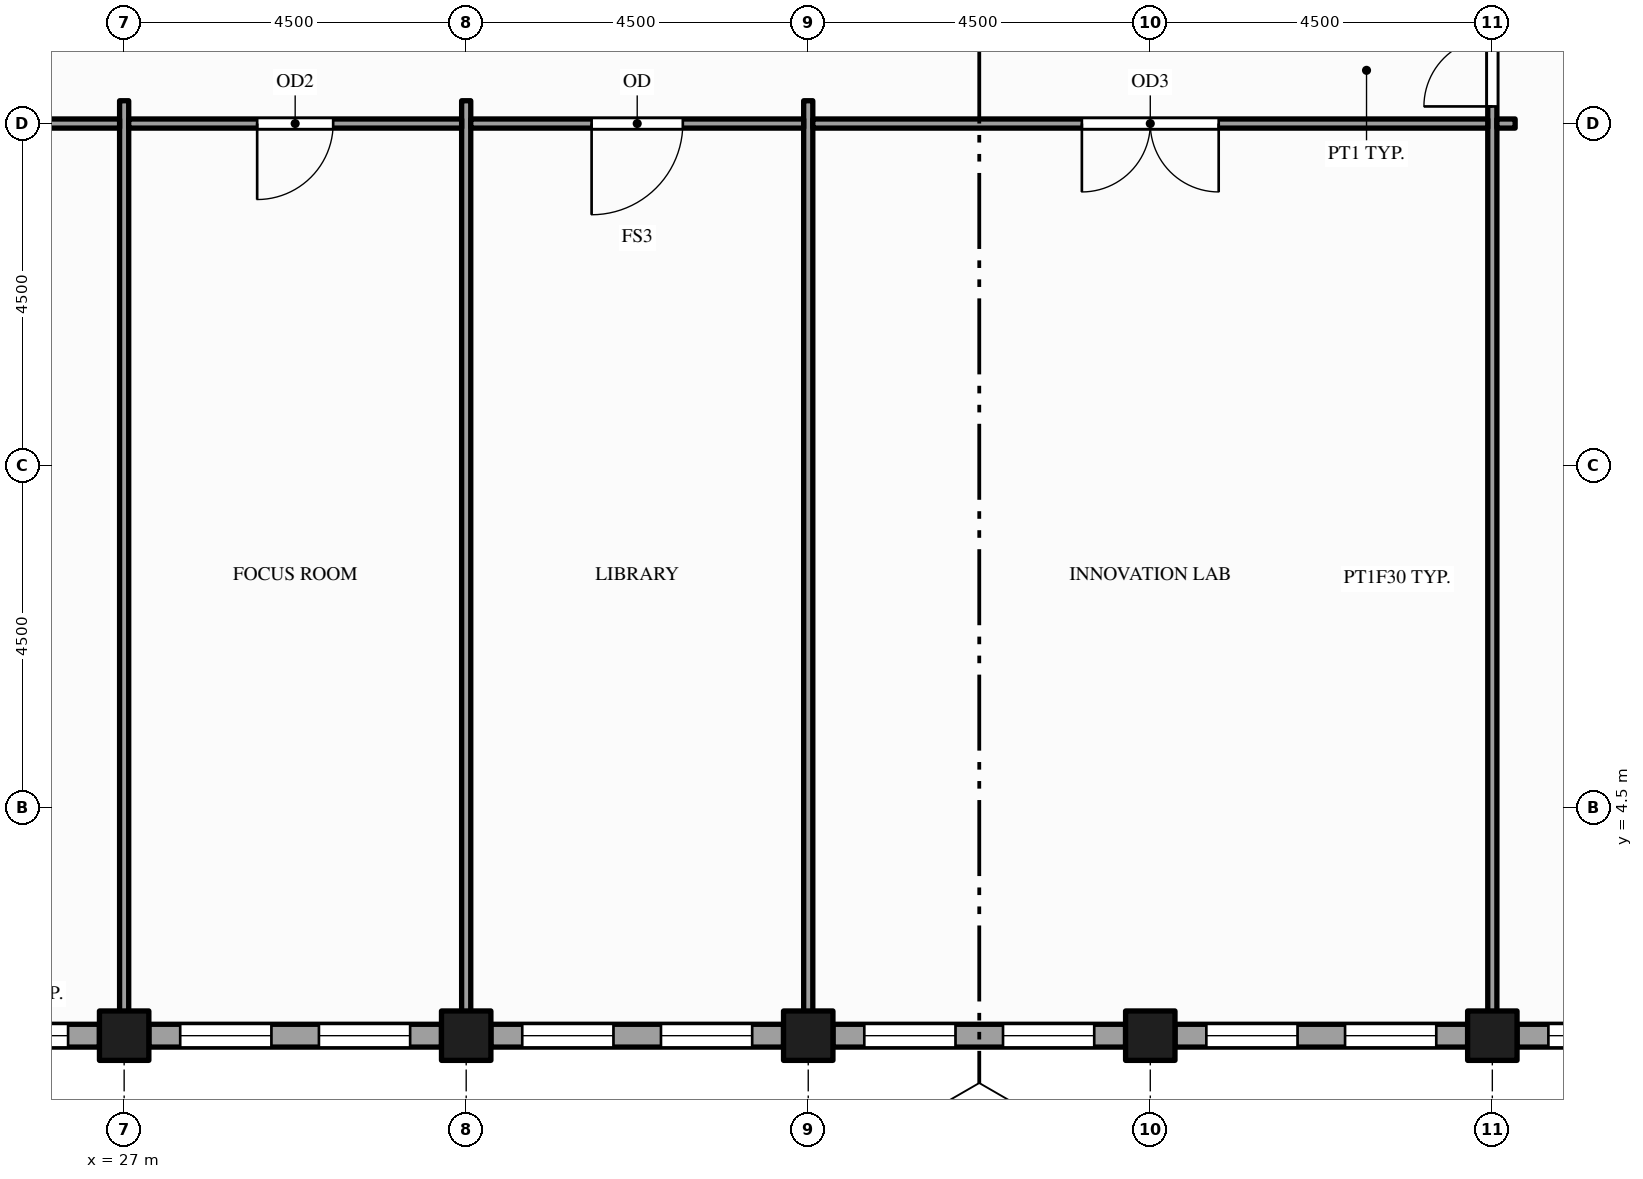
"""IFC4 building model, lengths in metres.
Left out: names, types, materials, properties, quantities, classifications, styles, units other than length and angle.
Written with IfcOpenShell. Run it as: python <this file> out.ifc"""

import sys

from ifc_helpers import new_model, si_unit, direction, frame, frame_2d, origin, origin_2d, place, context, subcontext, project, spatial, rectangle, hollow_rectangle, extrude, element, fill, save


model = new_model("IFC4")
c1 = context("Model", 3, precision=1e-05, world=origin(), true_north=direction((0.0, 1.0)))
c2 = subcontext(c1, "Body", "Model", "MODEL_VIEW")
j1 = project(units=[si_unit("LENGTHUNIT", "METRE"), si_unit("PLANEANGLEUNIT", "RADIAN")], contexts=[c1])
p1 = place(None, origin())
s1 = spatial("IfcSite", under=j1, at=p1, CompositionType="ELEMENT")
p2 = place(p1, origin())
s2 = spatial("IfcBuilding", under=s1, at=p2, CompositionType="ELEMENT")
p3 = place(p2, frame((0.0, 0.0, 285.0)))
s3 = spatial("IfcBuildingStorey", under=s2, at=p3, CompositionType="ELEMENT", Elevation=285.0)
for number, where, z_axis, x_axis in (
    (1, (27.0, 1.5, -0.15), (0.0, 0.0, 1.0), (1.0, 0.0, 0.0)),
    (2, (31.5, 1.5, -0.15), (0.0, 0.0, 1.0), (1.0, 0.0, 0.0)),
    (3, (36.0, 1.5, -0.15), (0.0, 0.0, 1.0), (1.0, 0.0, 0.0)),
    (4, (40.5, 1.5, -0.15), (0.0, 0.0, 1.0), (1.0, 0.0, 0.0)),
    (5, (45.0, 1.5, -0.15), (0.0, 0.0, 1.0), (1.0, 0.0, 0.0)),
):
    element("IfcColumn", number, at=place(p3, frame(where, z_axis=z_axis, x_axis=x_axis)), inside=s3, PredefinedType="COLUMN", context=c2, shape_type="SweptSolid", body=[
        extrude(hollow_rectangle(XDim=0.65, YDim=0.65, WallThickness=0.032, at=origin_2d()), origin(), (0.0, 0.0, 1.0), 4.0),
    ])
p4 = place(p3, frame((22.825, 1.5, 0.0), z_axis=(0.0, 0.0, 1.0), x_axis=(1.0, 0.0, 0.0)))
e6 = element("IfcWall", 6, at=p4, inside=s3, PredefinedType="STANDARD", context=c2, shape_type="SweptSolid", body=[
    extrude(rectangle(XDim=3.85, YDim=0.3, at=frame_2d((1.925, 0.0))), origin(), (0.0, 0.0, 1.0), 2.87),
])
p5 = place(p4, frame((0.413, 0.0, 0.9)))
e7 = element("IfcOpeningElement", 7, at=p5, cuts=e6, PredefinedType="OPENING", context=c2, shape_type="SweptSolid", body=[
    extrude(rectangle(XDim=1.2, YDim=1.75, at=frame_2d((0.6, 0.875))), frame((0.0, 0.16, 0.0), z_axis=(0.0, -1.0, 0.0), x_axis=(1.0, 0.0, 0.0)), (0.0, 0.0, 1.0), 0.32),
])
p6 = place(p4, frame((2.238, 0.0, 0.9)))
e8 = element("IfcOpeningElement", 8, at=p6, cuts=e6, PredefinedType="OPENING", context=c2, shape_type="SweptSolid", body=[
    extrude(rectangle(XDim=1.2, YDim=1.75, at=frame_2d((0.6, 0.875))), frame((0.0, 0.16, 0.0), z_axis=(0.0, -1.0, 0.0), x_axis=(1.0, 0.0, 0.0)), (0.0, 0.0, 1.0), 0.32),
])
p7 = place(p3, frame((27.325, 1.5, 0.0), z_axis=(0.0, 0.0, 1.0), x_axis=(1.0, 0.0, 0.0)))
e9 = element("IfcWall", 9, at=p7, inside=s3, PredefinedType="STANDARD", context=c2, shape_type="SweptSolid", body=[
    extrude(rectangle(XDim=3.85, YDim=0.3, at=frame_2d((1.925, 0.0))), origin(), (0.0, 0.0, 1.0), 2.87),
])
p8 = place(p7, frame((0.413, 0.0, 0.9)))
e10 = element("IfcOpeningElement", 10, at=p8, cuts=e9, PredefinedType="OPENING", context=c2, shape_type="SweptSolid", body=[
    extrude(rectangle(XDim=1.2, YDim=1.75, at=frame_2d((0.6, 0.875))), frame((0.0, 0.16, 0.0), z_axis=(0.0, -1.0, 0.0), x_axis=(1.0, 0.0, 0.0)), (0.0, 0.0, 1.0), 0.32),
])
p9 = place(p7, frame((2.238, 0.0, 0.9)))
e11 = element("IfcOpeningElement", 11, at=p9, cuts=e9, PredefinedType="OPENING", context=c2, shape_type="SweptSolid", body=[
    extrude(rectangle(XDim=1.2, YDim=1.75, at=frame_2d((0.6, 0.875))), frame((0.0, 0.16, 0.0), z_axis=(0.0, -1.0, 0.0), x_axis=(1.0, 0.0, 0.0)), (0.0, 0.0, 1.0), 0.32),
])
p10 = place(p3, frame((31.825, 1.5, 0.0), z_axis=(0.0, 0.0, 1.0), x_axis=(1.0, 0.0, 0.0)))
e12 = element("IfcWall", 12, at=p10, inside=s3, PredefinedType="STANDARD", context=c2, shape_type="SweptSolid", body=[
    extrude(rectangle(XDim=3.85, YDim=0.3, at=frame_2d((1.925, 0.0))), origin(), (0.0, 0.0, 1.0), 2.87),
])
p11 = place(p10, frame((0.413, 0.0, 0.9)))
e13 = element("IfcOpeningElement", 13, at=p11, cuts=e12, PredefinedType="OPENING", context=c2, shape_type="SweptSolid", body=[
    extrude(rectangle(XDim=1.2, YDim=1.75, at=frame_2d((0.6, 0.875))), frame((0.0, 0.16, 0.0), z_axis=(0.0, -1.0, 0.0), x_axis=(1.0, 0.0, 0.0)), (0.0, 0.0, 1.0), 0.32),
])
p12 = place(p10, frame((2.238, 0.0, 0.9)))
e14 = element("IfcOpeningElement", 14, at=p12, cuts=e12, PredefinedType="OPENING", context=c2, shape_type="SweptSolid", body=[
    extrude(rectangle(XDim=1.2, YDim=1.75, at=frame_2d((0.6, 0.875))), frame((0.0, 0.16, 0.0), z_axis=(0.0, -1.0, 0.0), x_axis=(1.0, 0.0, 0.0)), (0.0, 0.0, 1.0), 0.32),
])
p13 = place(p3, frame((36.325, 1.5, 0.0), z_axis=(0.0, 0.0, 1.0), x_axis=(1.0, 0.0, 0.0)))
e15 = element("IfcWall", 15, at=p13, inside=s3, PredefinedType="STANDARD", context=c2, shape_type="SweptSolid", body=[
    extrude(rectangle(XDim=3.85, YDim=0.3, at=frame_2d((1.925, 0.0))), origin(), (0.0, 0.0, 1.0), 2.87),
])
p14 = place(p13, frame((0.413, 0.0, 0.9)))
e16 = element("IfcOpeningElement", 16, at=p14, cuts=e15, PredefinedType="OPENING", context=c2, shape_type="SweptSolid", body=[
    extrude(rectangle(XDim=1.2, YDim=1.75, at=frame_2d((0.6, 0.875))), frame((0.0, 0.16, 0.0), z_axis=(0.0, -1.0, 0.0), x_axis=(1.0, 0.0, 0.0)), (0.0, 0.0, 1.0), 0.32),
])
p15 = place(p13, frame((2.238, 0.0, 0.9)))
e17 = element("IfcOpeningElement", 17, at=p15, cuts=e15, PredefinedType="OPENING", context=c2, shape_type="SweptSolid", body=[
    extrude(rectangle(XDim=1.2, YDim=1.75, at=frame_2d((0.6, 0.875))), frame((0.0, 0.16, 0.0), z_axis=(0.0, -1.0, 0.0), x_axis=(1.0, 0.0, 0.0)), (0.0, 0.0, 1.0), 0.32),
])
p16 = place(p3, frame((40.825, 1.5, 0.0), z_axis=(0.0, 0.0, 1.0), x_axis=(1.0, 0.0, 0.0)))
e18 = element("IfcWall", 18, at=p16, inside=s3, PredefinedType="STANDARD", context=c2, shape_type="SweptSolid", body=[
    extrude(rectangle(XDim=3.85, YDim=0.3, at=frame_2d((1.925, 0.0))), origin(), (0.0, 0.0, 1.0), 2.87),
])
p17 = place(p16, frame((0.413, 0.0, 0.9)))
e19 = element("IfcOpeningElement", 19, at=p17, cuts=e18, PredefinedType="OPENING", context=c2, shape_type="SweptSolid", body=[
    extrude(rectangle(XDim=1.2, YDim=1.75, at=frame_2d((0.6, 0.875))), frame((0.0, 0.16, 0.0), z_axis=(0.0, -1.0, 0.0), x_axis=(1.0, 0.0, 0.0)), (0.0, 0.0, 1.0), 0.32),
])
p18 = place(p16, frame((2.238, 0.0, 0.9)))
e20 = element("IfcOpeningElement", 20, at=p18, cuts=e18, PredefinedType="OPENING", context=c2, shape_type="SweptSolid", body=[
    extrude(rectangle(XDim=1.2, YDim=1.75, at=frame_2d((0.6, 0.875))), frame((0.0, 0.16, 0.0), z_axis=(0.0, -1.0, 0.0), x_axis=(1.0, 0.0, 0.0)), (0.0, 0.0, 1.0), 0.32),
])
p19 = place(p3, frame((45.325, 1.5, 0.0), z_axis=(0.0, 0.0, 1.0), x_axis=(1.0, 0.0, 0.0)))
e21 = element("IfcWall", 21, at=p19, inside=s3, PredefinedType="STANDARD", context=c2, shape_type="SweptSolid", body=[
    extrude(rectangle(XDim=3.85, YDim=0.3, at=frame_2d((1.925, 0.0))), origin(), (0.0, 0.0, 1.0), 2.87),
])
p20 = place(p19, frame((0.413, 0.0, 0.9)))
e22 = element("IfcOpeningElement", 22, at=p20, cuts=e21, PredefinedType="OPENING", context=c2, shape_type="SweptSolid", body=[
    extrude(rectangle(XDim=1.2, YDim=1.75, at=frame_2d((0.6, 0.875))), frame((0.0, 0.16, 0.0), z_axis=(0.0, -1.0, 0.0), x_axis=(1.0, 0.0, 0.0)), (0.0, 0.0, 1.0), 0.32),
])
p21 = place(p19, frame((2.238, 0.0, 0.9)))
e23 = element("IfcOpeningElement", 23, at=p21, cuts=e21, PredefinedType="OPENING", context=c2, shape_type="SweptSolid", body=[
    extrude(rectangle(XDim=1.2, YDim=1.75, at=frame_2d((0.6, 0.875))), frame((0.0, 0.16, 0.0), z_axis=(0.0, -1.0, 0.0), x_axis=(1.0, 0.0, 0.0)), (0.0, 0.0, 1.0), 0.32),
])
for number, where, z_axis, x_axis in (
    (24, (27.0, 1.65, 0.0), (0.0, 0.0, 1.0), (0.0, 1.0, 0.0)),
    (25, (31.5, 1.65, 0.0), (0.0, 0.0, 1.0), (0.0, 1.0, 0.0)),
    (26, (36.0, 1.65, 0.0), (0.0, 0.0, 1.0), (0.0, 1.0, 0.0)),
):
    element("IfcWall", number, at=place(p3, frame(where, z_axis=z_axis, x_axis=x_axis)), inside=s3, PredefinedType="PARTITIONING", context=c2, shape_type="SweptSolid", body=[
        extrude(rectangle(XDim=12.15, YDim=0.12, at=frame_2d((6.075, 0.0))), origin(), (0.0, 0.0, 1.0), 2.87),
    ])
p22 = place(p3, frame((45.0, 1.65, 0.0), z_axis=(0.0, 0.0, 1.0), x_axis=(0.0, 1.0, 0.0)))
e27 = element("IfcWall", 27, at=p22, inside=s3, PredefinedType="PARTITIONING", context=c2, shape_type="SweptSolid", body=[
    extrude(rectangle(XDim=22.2, YDim=0.12, at=frame_2d((11.1, 0.0))), origin(), (0.0, 0.0, 1.0), 2.87),
])
p23 = place(p22, frame((12.075, 0.0, 0.0)))
e28 = element("IfcOpeningElement", 28, at=p23, cuts=e27, PredefinedType="OPENING", context=c2, shape_type="SweptSolid", body=[
    extrude(rectangle(XDim=1.8, YDim=2.1, at=frame_2d((0.9, 1.05))), frame((0.0, 0.07, 0.0), z_axis=(0.0, -1.0, 0.0), x_axis=(1.0, 0.0, 0.0)), (0.0, 0.0, 1.0), 0.14),
])
p24 = place(p22, frame((15.1, 0.0, 0.0)))
e29 = element("IfcOpeningElement", 29, at=p24, cuts=e27, PredefinedType="OPENING", context=c2, shape_type="SweptSolid", body=[
    extrude(rectangle(XDim=0.9, YDim=2.1, at=frame_2d((0.45, 1.05))), frame((0.0, 0.07, 0.0), z_axis=(0.0, -1.0, 0.0), x_axis=(1.0, 0.0, 0.0)), (0.0, 0.0, 1.0), 0.14),
])
p25 = place(p22, frame((17.775, 0.0, 0.0)))
e30 = element("IfcOpeningElement", 30, at=p25, cuts=e27, PredefinedType="OPENING", context=c2, shape_type="SweptSolid", body=[
    extrude(rectangle(XDim=0.9, YDim=2.1, at=frame_2d((0.45, 1.05))), frame((0.0, 0.07, 0.0), z_axis=(0.0, -1.0, 0.0), x_axis=(1.0, 0.0, 0.0)), (0.0, 0.0, 1.0), 0.14),
])
p26 = place(p22, frame((20.35, 0.0, 0.0)))
e31 = element("IfcOpeningElement", 31, at=p26, cuts=e27, PredefinedType="OPENING", context=c2, shape_type="SweptSolid", body=[
    extrude(rectangle(XDim=1.0, YDim=2.1, at=frame_2d((0.5, 1.05))), frame((0.0, 0.07, 0.0), z_axis=(0.0, -1.0, 0.0), x_axis=(1.0, 0.0, 0.0)), (0.0, 0.0, 1.0), 0.14),
])
p27 = place(p3, frame((20.31, 13.5, 0.0), z_axis=(0.0, 0.0, 1.0), x_axis=(1.0, 0.0, 0.0)))
e32 = element("IfcWall", 32, at=p27, inside=s3, PredefinedType="PARTITIONING", context=c2, shape_type="SweptSolid", body=[
    extrude(rectangle(XDim=6.63, YDim=0.12, at=frame_2d((3.315, 0.0))), origin(), (0.0, 0.0, 1.0), 2.87),
])
p28 = place(p27, frame((2.815, 0.0, 0.0)))
e33 = element("IfcOpeningElement", 33, at=p28, cuts=e32, PredefinedType="OPENING", context=c2, shape_type="SweptSolid", body=[
    extrude(rectangle(XDim=1.0, YDim=2.1, at=frame_2d((0.5, 1.05))), frame((0.0, 0.07, 0.0), z_axis=(0.0, -1.0, 0.0), x_axis=(1.0, 0.0, 0.0)), (0.0, 0.0, 1.0), 0.14),
])
p29 = place(p3, frame((27.06, 13.5, 0.0), z_axis=(0.0, 0.0, 1.0), x_axis=(1.0, 0.0, 0.0)))
e34 = element("IfcWall", 34, at=p29, inside=s3, PredefinedType="PARTITIONING", context=c2, shape_type="SweptSolid", body=[
    extrude(rectangle(XDim=4.38, YDim=0.12, at=frame_2d((2.19, 0.0))), origin(), (0.0, 0.0, 1.0), 2.87),
])
p30 = place(p29, frame((1.69, 0.0, 0.0)))
e35 = element("IfcOpeningElement", 35, at=p30, cuts=e34, PredefinedType="OPENING", context=c2, shape_type="SweptSolid", body=[
    extrude(rectangle(XDim=1.0, YDim=2.1, at=frame_2d((0.5, 1.05))), frame((0.0, 0.07, 0.0), z_axis=(0.0, -1.0, 0.0), x_axis=(1.0, 0.0, 0.0)), (0.0, 0.0, 1.0), 0.14),
])
p31 = place(p3, frame((31.56, 13.5, 0.0), z_axis=(0.0, 0.0, 1.0), x_axis=(1.0, 0.0, 0.0)))
e36 = element("IfcWall", 36, at=p31, inside=s3, PredefinedType="PARTITIONING", context=c2, shape_type="SweptSolid", body=[
    extrude(rectangle(XDim=4.38, YDim=0.12, at=frame_2d((2.19, 0.0))), origin(), (0.0, 0.0, 1.0), 2.87),
])
p32 = place(p31, frame((1.59, 0.0, 0.0)))
e37 = element("IfcOpeningElement", 37, at=p32, cuts=e36, PredefinedType="OPENING", context=c2, shape_type="SweptSolid", body=[
    extrude(rectangle(XDim=1.2, YDim=2.1, at=frame_2d((0.6, 1.05))), frame((0.0, 0.07, 0.0), z_axis=(0.0, -1.0, 0.0), x_axis=(1.0, 0.0, 0.0)), (0.0, 0.0, 1.0), 0.14),
])
p33 = place(p3, frame((36.06, 13.5, 0.0), z_axis=(0.0, 0.0, 1.0), x_axis=(1.0, 0.0, 0.0)))
e38 = element("IfcWall", 38, at=p33, inside=s3, PredefinedType="PARTITIONING", context=c2, shape_type="SweptSolid", body=[
    extrude(rectangle(XDim=8.88, YDim=0.12, at=frame_2d((4.44, 0.0))), origin(), (0.0, 0.0, 1.0), 2.87),
])
p34 = place(p33, frame((3.54, 0.0, 0.0)))
e39 = element("IfcOpeningElement", 39, at=p34, cuts=e38, PredefinedType="OPENING", context=c2, shape_type="SweptSolid", body=[
    extrude(rectangle(XDim=1.8, YDim=2.1, at=frame_2d((0.9, 1.05))), frame((0.0, 0.07, 0.0), z_axis=(0.0, -1.0, 0.0), x_axis=(1.0, 0.0, 0.0)), (0.0, 0.0, 1.0), 0.14),
])
p35 = place(p3, frame((45.06, 13.5, 0.0), z_axis=(0.0, 0.0, 1.0), x_axis=(1.0, 0.0, 0.0)))
e40 = element("IfcWall", 40, at=p35, inside=s3, PredefinedType="PARTITIONING", context=c2, shape_type="SweptSolid", body=[
    extrude(rectangle(XDim=0.24, YDim=0.12, at=frame_2d((0.12, 0.0))), origin(), (0.0, 0.0, 1.0), 2.87),
])
p36 = place(p6, origin())
e41 = element("IfcWindow", 41, at=p36, inside=s3, PartitioningType="SINGLE_PANEL", PredefinedType="WINDOW", context=c2, shape_type="SweptSolid", body=[
    extrude(rectangle(XDim=1.2, YDim=1.75, at=frame_2d((0.6, 0.875))), frame((0.0, 0.03, 0.0), z_axis=(0.0, -1.0, 0.0), x_axis=(1.0, 0.0, 0.0)), (0.0, 0.0, 1.0), 0.06),
])
fill(e8, e41)
p37 = place(p8, origin())
e42 = element("IfcWindow", 42, at=p37, inside=s3, PartitioningType="SINGLE_PANEL", PredefinedType="WINDOW", context=c2, shape_type="SweptSolid", body=[
    extrude(rectangle(XDim=1.2, YDim=1.75, at=frame_2d((0.6, 0.875))), frame((0.0, 0.03, 0.0), z_axis=(0.0, -1.0, 0.0), x_axis=(1.0, 0.0, 0.0)), (0.0, 0.0, 1.0), 0.06),
])
fill(e10, e42)
p38 = place(p9, origin())
e43 = element("IfcWindow", 43, at=p38, inside=s3, PartitioningType="SINGLE_PANEL", PredefinedType="WINDOW", context=c2, shape_type="SweptSolid", body=[
    extrude(rectangle(XDim=1.2, YDim=1.75, at=frame_2d((0.6, 0.875))), frame((0.0, 0.03, 0.0), z_axis=(0.0, -1.0, 0.0), x_axis=(1.0, 0.0, 0.0)), (0.0, 0.0, 1.0), 0.06),
])
fill(e11, e43)
p39 = place(p11, origin())
e44 = element("IfcWindow", 44, at=p39, inside=s3, PartitioningType="SINGLE_PANEL", PredefinedType="WINDOW", context=c2, shape_type="SweptSolid", body=[
    extrude(rectangle(XDim=1.2, YDim=1.75, at=frame_2d((0.6, 0.875))), frame((0.0, 0.03, 0.0), z_axis=(0.0, -1.0, 0.0), x_axis=(1.0, 0.0, 0.0)), (0.0, 0.0, 1.0), 0.06),
])
fill(e13, e44)
p40 = place(p12, origin())
e45 = element("IfcWindow", 45, at=p40, inside=s3, PartitioningType="SINGLE_PANEL", PredefinedType="WINDOW", context=c2, shape_type="SweptSolid", body=[
    extrude(rectangle(XDim=1.2, YDim=1.75, at=frame_2d((0.6, 0.875))), frame((0.0, 0.03, 0.0), z_axis=(0.0, -1.0, 0.0), x_axis=(1.0, 0.0, 0.0)), (0.0, 0.0, 1.0), 0.06),
])
fill(e14, e45)
p41 = place(p14, origin())
e46 = element("IfcWindow", 46, at=p41, inside=s3, PartitioningType="SINGLE_PANEL", PredefinedType="WINDOW", context=c2, shape_type="SweptSolid", body=[
    extrude(rectangle(XDim=1.2, YDim=1.75, at=frame_2d((0.6, 0.875))), frame((0.0, 0.03, 0.0), z_axis=(0.0, -1.0, 0.0), x_axis=(1.0, 0.0, 0.0)), (0.0, 0.0, 1.0), 0.06),
])
fill(e16, e46)
p42 = place(p15, origin())
e47 = element("IfcWindow", 47, at=p42, inside=s3, PartitioningType="SINGLE_PANEL", PredefinedType="WINDOW", context=c2, shape_type="SweptSolid", body=[
    extrude(rectangle(XDim=1.2, YDim=1.75, at=frame_2d((0.6, 0.875))), frame((0.0, 0.03, 0.0), z_axis=(0.0, -1.0, 0.0), x_axis=(1.0, 0.0, 0.0)), (0.0, 0.0, 1.0), 0.06),
])
fill(e17, e47)
p43 = place(p17, origin())
e48 = element("IfcWindow", 48, at=p43, inside=s3, PartitioningType="SINGLE_PANEL", PredefinedType="WINDOW", context=c2, shape_type="SweptSolid", body=[
    extrude(rectangle(XDim=1.2, YDim=1.75, at=frame_2d((0.6, 0.875))), frame((0.0, 0.03, 0.0), z_axis=(0.0, -1.0, 0.0), x_axis=(1.0, 0.0, 0.0)), (0.0, 0.0, 1.0), 0.06),
])
fill(e19, e48)
p44 = place(p18, origin())
e49 = element("IfcWindow", 49, at=p44, inside=s3, PartitioningType="SINGLE_PANEL", PredefinedType="WINDOW", context=c2, shape_type="SweptSolid", body=[
    extrude(rectangle(XDim=1.2, YDim=1.75, at=frame_2d((0.6, 0.875))), frame((0.0, 0.03, 0.0), z_axis=(0.0, -1.0, 0.0), x_axis=(1.0, 0.0, 0.0)), (0.0, 0.0, 1.0), 0.06),
])
fill(e20, e49)
p45 = place(p20, origin())
e50 = element("IfcWindow", 50, at=p45, inside=s3, PartitioningType="SINGLE_PANEL", PredefinedType="WINDOW", context=c2, shape_type="SweptSolid", body=[
    extrude(rectangle(XDim=1.2, YDim=1.75, at=frame_2d((0.6, 0.875))), frame((0.0, 0.03, 0.0), z_axis=(0.0, -1.0, 0.0), x_axis=(1.0, 0.0, 0.0)), (0.0, 0.0, 1.0), 0.06),
])
fill(e22, e50)
p46 = place(p23, origin())
e51 = element("IfcDoor", 51, at=p46, inside=s3, OperationType="DOUBLE_DOOR_SINGLE_SWING", PredefinedType="DOOR", context=c2, shape_type="SweptSolid", body=[
    extrude(rectangle(XDim=1.8, YDim=2.1, at=frame_2d((0.9, 1.05))), frame((0.0, 0.025, 0.0), z_axis=(0.0, -1.0, 0.0), x_axis=(1.0, 0.0, 0.0)), (0.0, 0.0, 1.0), 0.05),
])
fill(e28, e51)
p47 = place(p30, origin())
e52 = element("IfcDoor", 52, at=p47, inside=s3, OperationType="SINGLE_SWING_LEFT", PredefinedType="DOOR", context=c2, shape_type="SweptSolid", body=[
    extrude(rectangle(XDim=1.0, YDim=2.1, at=frame_2d((0.5, 1.05))), frame((0.0, 0.025, 0.0), z_axis=(0.0, -1.0, 0.0), x_axis=(1.0, 0.0, 0.0)), (0.0, 0.0, 1.0), 0.05),
])
fill(e35, e52)
p48 = place(p32, origin())
e53 = element("IfcDoor", 53, at=p48, inside=s3, OperationType="SINGLE_SWING_LEFT", PredefinedType="DOOR", context=c2, shape_type="SweptSolid", body=[
    extrude(rectangle(XDim=1.2, YDim=2.1, at=frame_2d((0.6, 1.05))), frame((0.0, 0.025, 0.0), z_axis=(0.0, -1.0, 0.0), x_axis=(1.0, 0.0, 0.0)), (0.0, 0.0, 1.0), 0.05),
])
fill(e37, e53)
p49 = place(p34, origin())
e54 = element("IfcDoor", 54, at=p49, inside=s3, OperationType="DOUBLE_DOOR_SINGLE_SWING", PredefinedType="DOOR", context=c2, shape_type="SweptSolid", body=[
    extrude(rectangle(XDim=1.8, YDim=2.1, at=frame_2d((0.9, 1.05))), frame((0.0, 0.025, 0.0), z_axis=(0.0, -1.0, 0.0), x_axis=(1.0, 0.0, 0.0)), (0.0, 0.0, 1.0), 0.05),
])
fill(e39, e54)
save(model, sys.argv[1])
